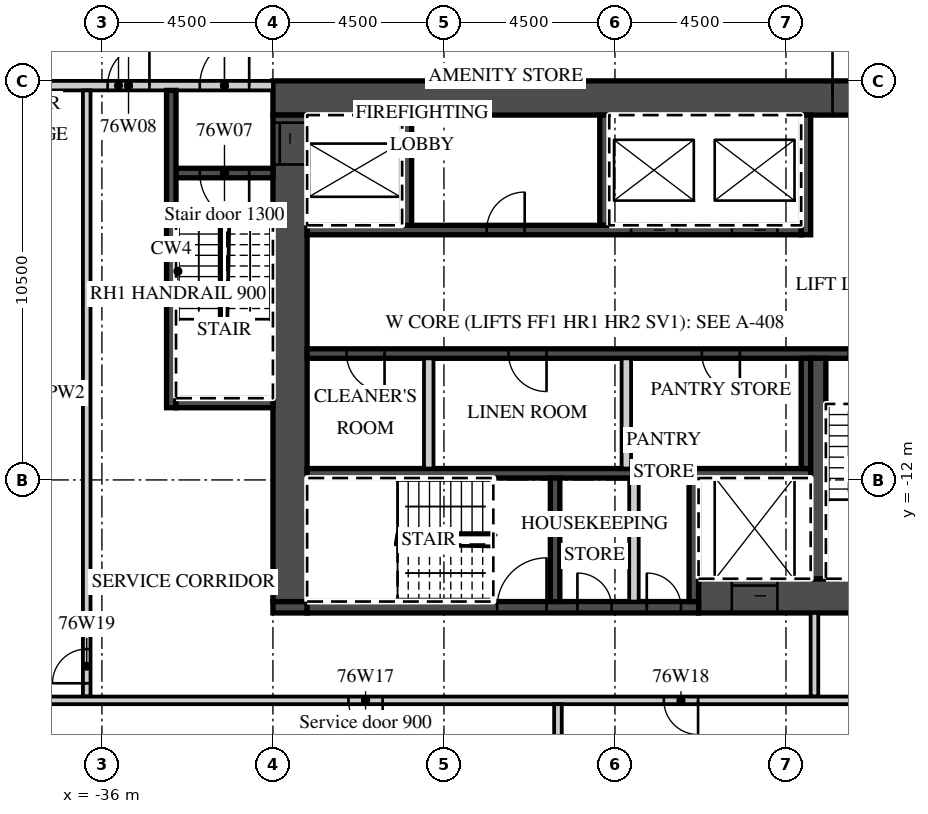
"""IFC4 building model, lengths in metres.
Left out: names, types, materials, properties, quantities, classifications, styles, units other than length and angle.
Written with IfcOpenShell. Run it as: python <this file> out.ifc"""

import sys

from ifc_helpers import new_model, si_unit, direction, frame, frame_2d, origin, place, context, subcontext, project, spatial, rectangle, extrude, element, fill, save


model = new_model("IFC4")
c1 = context("Model", 3, precision=1e-05, world=origin(), true_north=direction((0.0, 1.0)))
c2 = subcontext(c1, "Body", "Model", "MODEL_VIEW")
j1 = project(units=[si_unit("LENGTHUNIT", "METRE"), si_unit("PLANEANGLEUNIT", "RADIAN")], contexts=[c1])
p1 = place(None, origin())
s1 = spatial("IfcSite", under=j1, at=p1, CompositionType="ELEMENT")
p2 = place(p1, origin())
s2 = spatial("IfcBuilding", under=s1, at=p2, CompositionType="ELEMENT")
p3 = place(p2, frame((0.0, 0.0, 301.5)))
s3 = spatial("IfcBuildingStorey", under=s2, at=p3, CompositionType="ELEMENT", Elevation=301.5)
p4 = place(p3, frame((-31.5, -1.95, 0.0), z_axis=(0.0, 0.0, 1.0), x_axis=(1.0, 0.0, 0.0)))
e1 = element("IfcWall", 1, at=p4, inside=s3, PredefinedType="SHEAR", context=c2, shape_type="SweptSolid", body=[
    extrude(rectangle(XDim=18.0, YDim=0.9, at=frame_2d((9.0, 0.0))), origin(), (0.0, 0.0, 1.0), 3.02),
])
p5 = place(p4, frame((14.725, 0.0, 0.0)))
e2 = element("IfcOpeningElement", 2, at=p5, cuts=e1, PredefinedType="OPENING", context=c2, shape_type="SweptSolid", body=[
    extrude(rectangle(XDim=1.8, YDim=2.1, at=frame_2d((0.9, 1.05))), frame((0.0, 0.46, 0.0), z_axis=(0.0, -1.0, 0.0), x_axis=(1.0, 0.0, 0.0)), (0.0, 0.0, 1.0), 0.92),
])
p6 = place(p3, frame((-20.3, -15.05, 0.0), z_axis=(0.0, 0.0, 1.0), x_axis=(1.0, 0.0, 0.0)))
e3 = element("IfcWall", 3, at=p6, inside=s3, PredefinedType="SHEAR", context=c2, shape_type="SweptSolid", body=[
    extrude(rectangle(XDim=6.8, YDim=0.9, at=frame_2d((3.4, 0.0))), origin(), (0.0, 0.0, 1.0), 3.02),
])
p7 = place(p6, frame((0.875, 0.0, 0.0)))
e4 = element("IfcOpeningElement", 4, at=p7, cuts=e3, PredefinedType="OPENING", context=c2, shape_type="SweptSolid", body=[
    extrude(rectangle(XDim=1.2, YDim=2.1, at=frame_2d((0.6, 1.05))), frame((0.0, 0.46, 0.0), z_axis=(0.0, -1.0, 0.0), x_axis=(1.0, 0.0, 0.0)), (0.0, 0.0, 1.0), 0.92),
])
p8 = place(p3, frame((-31.5, -15.35, 0.0), z_axis=(0.0, 0.0, 1.0), x_axis=(1.0, 0.0, 0.0)))
e5 = element("IfcWall", 5, at=p8, inside=s3, PredefinedType="SHEAR", context=c2, shape_type="SweptSolid", body=[
    extrude(rectangle(XDim=0.9, YDim=0.3, at=frame_2d((0.45, 0.0))), origin(), (0.0, 0.0, 1.0), 3.02),
])
p9 = place(p3, frame((-30.6, -15.35, 0.0), z_axis=(0.0, 0.0, 1.0), x_axis=(1.0, 0.0, 0.0)))
e6 = element("IfcWall", 6, at=p9, inside=s3, PredefinedType="SHEAR", context=c2, shape_type="SweptSolid", body=[
    extrude(rectangle(XDim=10.3, YDim=0.3, at=frame_2d((5.15, 0.0))), origin(), (0.0, 0.0, 1.0), 3.02),
])
p10 = place(p9, frame((5.0, 0.0, 0.0)))
e7 = element("IfcOpeningElement", 7, at=p10, cuts=e6, PredefinedType="OPENING", context=c2, shape_type="SweptSolid", body=[
    extrude(rectangle(XDim=1.3, YDim=2.1, at=frame_2d((0.65, 1.05))), frame((0.0, 0.16, 0.0), z_axis=(0.0, -1.0, 0.0), x_axis=(1.0, 0.0, 0.0)), (0.0, 0.0, 1.0), 0.32),
])
p11 = place(p9, frame((7.113, 0.0, 0.0)))
e8 = element("IfcOpeningElement", 8, at=p11, cuts=e6, PredefinedType="OPENING", context=c2, shape_type="SweptSolid", body=[
    extrude(rectangle(XDim=0.9, YDim=2.1, at=frame_2d((0.45, 1.05))), frame((0.0, 0.16, 0.0), z_axis=(0.0, -1.0, 0.0), x_axis=(1.0, 0.0, 0.0)), (0.0, 0.0, 1.0), 0.32),
])
p12 = place(p9, frame((8.938, 0.0, 0.0)))
e9 = element("IfcOpeningElement", 9, at=p12, cuts=e6, PredefinedType="OPENING", context=c2, shape_type="SweptSolid", body=[
    extrude(rectangle(XDim=0.9, YDim=2.1, at=frame_2d((0.45, 1.05))), frame((0.0, 0.16, 0.0), z_axis=(0.0, -1.0, 0.0), x_axis=(1.0, 0.0, 0.0)), (0.0, 0.0, 1.0), 0.32),
])
p13 = place(p3, frame((-31.05, -15.2, 0.0), z_axis=(0.0, 0.0, 1.0), x_axis=(0.0, 1.0, 0.0)))
e10 = element("IfcWall", 10, at=p13, inside=s3, PredefinedType="SHEAR", context=c2, shape_type="SweptSolid", body=[
    extrude(rectangle(XDim=12.8, YDim=0.9, at=frame_2d((6.4, 0.0))), origin(), (0.0, 0.0, 1.0), 3.02),
])
p14 = place(p13, frame((11.5, 0.0, 0.0)))
e11 = element("IfcOpeningElement", 11, at=p14, cuts=e10, PredefinedType="OPENING", context=c2, shape_type="SweptSolid", body=[
    extrude(rectangle(XDim=1.1, YDim=2.1, at=frame_2d((0.55, 1.05))), frame((0.0, 0.46, 0.0), z_axis=(0.0, -1.0, 0.0), x_axis=(1.0, 0.0, 0.0)), (0.0, 0.0, 1.0), 0.92),
])
p15 = place(p3, frame((-30.6, -5.425, 0.0), z_axis=(0.0, 0.0, 1.0), x_axis=(1.0, 0.0, 0.0)))
e12 = element("IfcWall", 12, at=p15, inside=s3, PredefinedType="SHEAR", context=c2, shape_type="SweptSolid", body=[
    extrude(rectangle(XDim=13.0, YDim=0.25, at=frame_2d((6.5, 0.0))), origin(), (0.0, 0.0, 1.0), 3.02),
])
p16 = place(p15, frame((8.525, 0.0, 0.0)))
e13 = element("IfcOpeningElement", 13, at=p16, cuts=e12, PredefinedType="OPENING", context=c2, shape_type="SweptSolid", body=[
    extrude(rectangle(XDim=1.2, YDim=2.1, at=frame_2d((0.6, 1.05))), frame((0.0, 0.135, 0.0), z_axis=(0.0, -1.0, 0.0), x_axis=(1.0, 0.0, 0.0)), (0.0, 0.0, 1.0), 0.27),
])
p17 = place(p15, frame((11.175, 0.0, 0.0)))
e14 = element("IfcOpeningElement", 14, at=p17, cuts=e12, PredefinedType="OPENING", context=c2, shape_type="SweptSolid", body=[
    extrude(rectangle(XDim=1.2, YDim=2.1, at=frame_2d((0.6, 1.05))), frame((0.0, 0.135, 0.0), z_axis=(0.0, -1.0, 0.0), x_axis=(1.0, 0.0, 0.0)), (0.0, 0.0, 1.0), 0.27),
])
p18 = place(p15, frame((4.725, 0.0, 0.0)))
e15 = element("IfcOpeningElement", 15, at=p18, cuts=e12, PredefinedType="OPENING", context=c2, shape_type="SweptSolid", body=[
    extrude(rectangle(XDim=1.0, YDim=2.1, at=frame_2d((0.5, 1.05))), frame((0.0, 0.135, 0.0), z_axis=(0.0, -1.0, 0.0), x_axis=(1.0, 0.0, 0.0)), (0.0, 0.0, 1.0), 0.27),
])
p19 = place(p3, frame((-17.475, -5.55, 0.0), z_axis=(0.0, 0.0, 1.0), x_axis=(0.0, 1.0, 0.0)))
e16 = element("IfcWall", 16, at=p19, inside=s3, PredefinedType="SHEAR", context=c2, shape_type="SweptSolid", body=[
    extrude(rectangle(XDim=3.15, YDim=0.25, at=frame_2d((1.575, 0.0))), origin(), (0.0, 0.0, 1.0), 3.02),
])
for number, where, z_axis, x_axis in (
    (17, (-27.975, -5.3, 0.0), (0.0, 0.0, 1.0), (0.0, 1.0, 0.0)),
    (18, (-22.775, -5.3, 0.0), (0.0, 0.0, 1.0), (0.0, 1.0, 0.0)),
):
    element("IfcWall", number, at=place(p3, frame(where, z_axis=z_axis, x_axis=x_axis)), inside=s3, PredefinedType="SHEAR", context=c2, shape_type="SweptSolid", body=[
        extrude(rectangle(XDim=2.9, YDim=0.25, at=frame_2d((1.45, 0.0))), origin(), (0.0, 0.0, 1.0), 3.02),
    ])
p20 = place(p3, frame((-30.6, -8.675, 0.0), z_axis=(0.0, 0.0, 1.0), x_axis=(1.0, 0.0, 0.0)))
e19 = element("IfcWall", 19, at=p20, inside=s3, PredefinedType="SHEAR", context=c2, shape_type="SweptSolid", body=[
    extrude(rectangle(XDim=16.2, YDim=0.25, at=frame_2d((8.1, 0.0))), origin(), (0.0, 0.0, 1.0), 3.02),
])
p21 = place(p20, frame((14.25, 0.0, 0.0)))
e20 = element("IfcOpeningElement", 20, at=p21, cuts=e19, PredefinedType="OPENING", context=c2, shape_type="SweptSolid", body=[
    extrude(rectangle(XDim=1.3, YDim=2.1, at=frame_2d((0.65, 1.05))), frame((0.0, 0.135, 0.0), z_axis=(0.0, -1.0, 0.0), x_axis=(1.0, 0.0, 0.0)), (0.0, 0.0, 1.0), 0.27),
])
p22 = place(p20, frame((1.038, 0.0, 0.0)))
e21 = element("IfcOpeningElement", 21, at=p22, cuts=e19, PredefinedType="OPENING", context=c2, shape_type="SweptSolid", body=[
    extrude(rectangle(XDim=1.0, YDim=2.1, at=frame_2d((0.5, 1.05))), frame((0.0, 0.135, 0.0), z_axis=(0.0, -1.0, 0.0), x_axis=(1.0, 0.0, 0.0)), (0.0, 0.0, 1.0), 0.27),
])
p23 = place(p20, frame((5.3, 0.0, 0.0)))
e22 = element("IfcOpeningElement", 22, at=p23, cuts=e19, PredefinedType="OPENING", context=c2, shape_type="SweptSolid", body=[
    extrude(rectangle(XDim=1.0, YDim=2.1, at=frame_2d((0.5, 1.05))), frame((0.0, 0.135, 0.0), z_axis=(0.0, -1.0, 0.0), x_axis=(1.0, 0.0, 0.0)), (0.0, 0.0, 1.0), 0.27),
])
p24 = place(p20, frame((10.387, 0.0, 0.0)))
e23 = element("IfcOpeningElement", 23, at=p24, cuts=e19, PredefinedType="OPENING", context=c2, shape_type="SweptSolid", body=[
    extrude(rectangle(XDim=1.0, YDim=2.1, at=frame_2d((0.5, 1.05))), frame((0.0, 0.135, 0.0), z_axis=(0.0, -1.0, 0.0), x_axis=(1.0, 0.0, 0.0)), (0.0, 0.0, 1.0), 0.27),
])
p25 = place(p3, frame((-30.6, -11.825, 0.0), z_axis=(0.0, 0.0, 1.0), x_axis=(1.0, 0.0, 0.0)))
e24 = element("IfcWall", 24, at=p25, inside=s3, PredefinedType="SHEAR", context=c2, shape_type="SweptSolid", body=[
    extrude(rectangle(XDim=13.25, YDim=0.25, at=frame_2d((6.625, 0.0))), origin(), (0.0, 0.0, 1.0), 3.02),
])
p26 = place(p3, frame((-17.475, -11.7, 0.0), z_axis=(0.0, 0.0, 1.0), x_axis=(0.0, 1.0, 0.0)))
e25 = element("IfcWall", 25, at=p26, inside=s3, PredefinedType="SHEAR", context=c2, shape_type="SweptSolid", body=[
    extrude(rectangle(XDim=2.9, YDim=0.25, at=frame_2d((1.45, 0.0))), origin(), (0.0, 0.0, 1.0), 3.02),
])
for number, where, z_axis, x_axis in (
    (26, (-27.4, -11.7, 0.0), (0.0, 0.0, 1.0), (0.0, 1.0, 0.0)),
    (27, (-22.2, -11.7, 0.0), (0.0, 0.0, 1.0), (0.0, 1.0, 0.0)),
):
    element("IfcWall", number, at=place(p3, frame(where, z_axis=z_axis, x_axis=x_axis)), inside=s3, PredefinedType="PARTITIONING", context=c2, shape_type="SweptSolid", body=[
        extrude(rectangle(XDim=2.9, YDim=0.25, at=frame_2d((1.45, 0.0))), origin(), (0.0, 0.0, 1.0), 3.02),
    ])
p27 = place(p3, frame((-17.15, -14.6, 0.0), z_axis=(0.0, 0.0, 1.0), x_axis=(0.0, 1.0, 0.0)))
e28 = element("IfcWall", 28, at=p27, inside=s3, PredefinedType="SHEAR", context=c2, shape_type="SweptSolid", body=[
    extrude(rectangle(XDim=5.8, YDim=0.4, at=frame_2d((2.9, 0.0))), origin(), (0.0, 0.0, 1.0), 3.02),
])
for number, where, z_axis, x_axis in (
    (29, (-20.425, -15.2, 0.0), (0.0, 0.0, 1.0), (0.0, 1.0, 0.0)),
    (30, (-24.075, -15.2, 0.0), (0.0, 0.0, 1.0), (0.0, 1.0, 0.0)),
):
    element("IfcWall", number, at=place(p3, frame(where, z_axis=z_axis, x_axis=x_axis)), inside=s3, PredefinedType="SHEAR", context=c2, shape_type="SweptSolid", body=[
        extrude(rectangle(XDim=3.25, YDim=0.25, at=frame_2d((1.625, 0.0))), origin(), (0.0, 0.0, 1.0), 3.02),
    ])
p28 = place(p3, frame((-22.0, -15.2, 0.0), z_axis=(0.0, 0.0, 1.0), x_axis=(0.0, 1.0, 0.0)))
e31 = element("IfcWall", 31, at=p28, inside=s3, PredefinedType="PARTITIONING", context=c2, shape_type="SweptSolid", body=[
    extrude(rectangle(XDim=3.25, YDim=0.25, at=frame_2d((1.625, 0.0))), origin(), (0.0, 0.0, 1.0), 3.02),
])
p29 = place(p3, frame((-39.627, -1.625, 0.0), z_axis=(0.0, 0.0, 1.0), x_axis=(1.0, 0.0, 0.0)))
e32 = element("IfcWall", 32, at=p29, inside=s3, PredefinedType="PARTITIONING", context=c2, shape_type="SweptSolid", body=[
    extrude(rectangle(XDim=8.127, YDim=0.25, at=frame_2d((4.063, 0.0))), origin(), (0.0, 0.0, 1.0), 3.02),
])
p30 = place(p29, frame((6.202, 0.0, 0.0)))
e33 = element("IfcOpeningElement", 33, at=p30, cuts=e32, PredefinedType="OPENING", context=c2, shape_type="SweptSolid", body=[
    extrude(rectangle(XDim=1.3, YDim=2.1, at=frame_2d((0.65, 1.05))), frame((0.0, 0.135, 0.0), z_axis=(0.0, -1.0, 0.0), x_axis=(1.0, 0.0, 0.0)), (0.0, 0.0, 1.0), 0.27),
])
p31 = place(p29, frame((3.777, 0.0, 0.0)))
e34 = element("IfcOpeningElement", 34, at=p31, cuts=e32, PredefinedType="OPENING", context=c2, shape_type="SweptSolid", body=[
    extrude(rectangle(XDim=1.1, YDim=2.1, at=frame_2d((0.55, 1.05))), frame((0.0, 0.135, 0.0), z_axis=(0.0, -1.0, 0.0), x_axis=(1.0, 0.0, 0.0)), (0.0, 0.0, 1.0), 0.27),
])
p32 = place(p3, frame((-34.05, -3.925, 0.0), z_axis=(0.0, 0.0, 1.0), x_axis=(1.0, 0.0, 0.0)))
e35 = element("IfcWall", 35, at=p32, inside=s3, PredefinedType="SHEAR", context=c2, shape_type="SweptSolid", body=[
    extrude(rectangle(XDim=2.55, YDim=0.25, at=frame_2d((1.275, 0.0))), origin(), (0.0, 0.0, 1.0), 3.02),
])
p33 = place(p32, frame((0.625, 0.0, 0.0)))
e36 = element("IfcOpeningElement", 36, at=p33, cuts=e35, PredefinedType="OPENING", context=c2, shape_type="SweptSolid", body=[
    extrude(rectangle(XDim=1.3, YDim=2.1, at=frame_2d((0.65, 1.05))), frame((0.0, 0.135, 0.0), z_axis=(0.0, -1.0, 0.0), x_axis=(1.0, 0.0, 0.0)), (0.0, 0.0, 1.0), 0.27),
])
p34 = place(p3, frame((-34.175, -10.1, 0.0), z_axis=(0.0, 0.0, 1.0), x_axis=(0.0, 1.0, 0.0)))
e37 = element("IfcWall", 37, at=p34, inside=s3, PredefinedType="SHEAR", context=c2, shape_type="SweptSolid", body=[
    extrude(rectangle(XDim=8.35, YDim=0.25, at=frame_2d((4.175, 0.0))), origin(), (0.0, 0.0, 1.0), 3.02),
])
p35 = place(p3, frame((-34.05, -9.975, 0.0), z_axis=(0.0, 0.0, 1.0), x_axis=(1.0, 0.0, 0.0)))
e38 = element("IfcWall", 38, at=p35, inside=s3, PredefinedType="SHEAR", context=c2, shape_type="SweptSolid", body=[
    extrude(rectangle(XDim=2.55, YDim=0.25, at=frame_2d((1.275, 0.0))), origin(), (0.0, 0.0, 1.0), 3.02),
])
p36 = place(p3, frame((-17.25, -17.7, 0.0), z_axis=(0.0, 0.0, 1.0), x_axis=(0.0, 1.0, 0.0)))
e39 = element("IfcWall", 39, at=p36, inside=s3, PredefinedType="PARTITIONING", context=c2, shape_type="SweptSolid", body=[
    extrude(rectangle(XDim=2.2, YDim=0.2, at=frame_2d((1.1, 0.0))), origin(), (0.0, 0.0, 1.0), 3.02),
])
p37 = place(p3, frame((-36.4, -17.7, 0.0), z_axis=(0.0, 0.0, 1.0), x_axis=(0.0, 1.0, 0.0)))
e40 = element("IfcWall", 40, at=p37, inside=s3, PredefinedType="PARTITIONING", context=c2, shape_type="SweptSolid", body=[
    extrude(rectangle(XDim=15.95, YDim=0.2, at=frame_2d((7.975, 0.0))), origin(), (0.0, 0.0, 1.0), 3.02),
])
p38 = place(p37, frame((0.35, 0.0, 0.0)))
e41 = element("IfcOpeningElement", 41, at=p38, cuts=e40, PredefinedType="OPENING", context=c2, shape_type="SweptSolid", body=[
    extrude(rectangle(XDim=0.9, YDim=2.1, at=frame_2d((0.45, 1.05))), frame((0.0, 0.11, 0.0), z_axis=(0.0, -1.0, 0.0), x_axis=(1.0, 0.0, 0.0)), (0.0, 0.0, 1.0), 0.22),
])
p39 = place(p3, frame((-38.07, -17.8, 0.0), z_axis=(0.0, 0.0, 1.0), x_axis=(1.0, 0.0, 0.0)))
e42 = element("IfcWall", 42, at=p39, inside=s3, PredefinedType="PARTITIONING", context=c2, shape_type="SweptSolid", body=[
    extrude(rectangle(XDim=24.47, YDim=0.2, at=frame_2d((12.235, 0.0))), origin(), (0.0, 0.0, 1.0), 3.02),
])
p40 = place(p39, frame((8.557, 0.0, 0.0)))
e43 = element("IfcOpeningElement", 43, at=p40, cuts=e42, PredefinedType="OPENING", context=c2, shape_type="SweptSolid", body=[
    extrude(rectangle(XDim=0.9, YDim=2.1, at=frame_2d((0.45, 1.05))), frame((0.0, 0.11, 0.0), z_axis=(0.0, -1.0, 0.0), x_axis=(1.0, 0.0, 0.0)), (0.0, 0.0, 1.0), 0.22),
])
p41 = place(p39, frame((16.857, 0.0, 0.0)))
e44 = element("IfcOpeningElement", 44, at=p41, cuts=e42, PredefinedType="OPENING", context=c2, shape_type="SweptSolid", body=[
    extrude(rectangle(XDim=0.9, YDim=2.1, at=frame_2d((0.45, 1.05))), frame((0.0, 0.11, 0.0), z_axis=(0.0, -1.0, 0.0), x_axis=(1.0, 0.0, 0.0)), (0.0, 0.0, 1.0), 0.22),
])
p42 = place(p3, frame((-24.0, -22.408, 0.0), z_axis=(0.0, 0.0, 1.0), x_axis=(0.0, 1.0, 0.0)))
e45 = element("IfcWall", 45, at=p42, inside=s3, PredefinedType="PARTITIONING", context=c2, shape_type="SweptSolid", body=[
    extrude(rectangle(XDim=4.508, YDim=0.2, at=frame_2d((2.254, 0.0))), origin(), (0.0, 0.0, 1.0), 3.02),
])
p43 = place(p16, origin())
e46 = element("IfcDoor", 46, at=p43, inside=s3, OperationType="SLIDING_TO_LEFT", PredefinedType="DOOR", context=c2, shape_type="SweptSolid", body=[
    extrude(rectangle(XDim=1.2, YDim=2.1, at=frame_2d((0.6, 1.05))), frame((0.0, 0.025, 0.0), z_axis=(0.0, -1.0, 0.0), x_axis=(1.0, 0.0, 0.0)), (0.0, 0.0, 1.0), 0.05),
])
fill(e13, e46)
p44 = place(p17, origin())
e47 = element("IfcDoor", 47, at=p44, inside=s3, OperationType="SLIDING_TO_RIGHT", PredefinedType="DOOR", context=c2, shape_type="SweptSolid", body=[
    extrude(rectangle(XDim=1.2, YDim=2.1, at=frame_2d((0.6, 1.05))), frame((0.0, 0.025, 0.0), z_axis=(0.0, -1.0, 0.0), x_axis=(1.0, 0.0, 0.0)), (0.0, 0.0, 1.0), 0.05),
])
fill(e14, e47)
p45 = place(p7, origin())
e48 = element("IfcDoor", 48, at=p45, inside=s3, OperationType="SLIDING_TO_LEFT", PredefinedType="DOOR", context=c2, shape_type="SweptSolid", body=[
    extrude(rectangle(XDim=1.2, YDim=2.1, at=frame_2d((0.6, 1.05))), frame((0.0, 0.025, 0.0), z_axis=(0.0, -1.0, 0.0), x_axis=(1.0, 0.0, 0.0)), (0.0, 0.0, 1.0), 0.05),
])
fill(e4, e48)
p46 = place(p14, origin())
e49 = element("IfcDoor", 49, at=p46, inside=s3, OperationType="SLIDING_TO_RIGHT", PredefinedType="DOOR", context=c2, shape_type="SweptSolid", body=[
    extrude(rectangle(XDim=1.1, YDim=2.1, at=frame_2d((0.55, 1.05))), frame((0.0, 0.025, 0.0), z_axis=(0.0, -1.0, 0.0), x_axis=(1.0, 0.0, 0.0)), (0.0, 0.0, 1.0), 0.05),
])
fill(e11, e49)
p47 = place(p5, origin())
e50 = element("IfcDoor", 50, at=p47, inside=s3, OperationType="DOUBLE_DOOR_DOUBLE_SWING", PredefinedType="DOOR", context=c2, shape_type="SweptSolid", body=[
    extrude(rectangle(XDim=1.8, YDim=2.1, at=frame_2d((0.9, 1.05))), frame((0.0, 0.025, 0.0), z_axis=(0.0, -1.0, 0.0), x_axis=(1.0, 0.0, 0.0)), (0.0, 0.0, 1.0), 0.05),
])
fill(e2, e50)
p48 = place(p30, origin())
e51 = element("IfcDoor", 51, at=p48, inside=s3, OperationType="SINGLE_SWING_RIGHT", PredefinedType="DOOR", context=c2, shape_type="SweptSolid", body=[
    extrude(rectangle(XDim=1.3, YDim=2.1, at=frame_2d((0.65, 1.05))), frame((0.0, 0.025, 0.0), z_axis=(0.0, -1.0, 0.0), x_axis=(1.0, 0.0, 0.0)), (0.0, 0.0, 1.0), 0.05),
])
fill(e33, e51)
p49 = place(p33, origin())
e52 = element("IfcDoor", 52, at=p49, inside=s3, OperationType="SINGLE_SWING_RIGHT", PredefinedType="DOOR", context=c2, shape_type="SweptSolid", body=[
    extrude(rectangle(XDim=1.3, YDim=2.1, at=frame_2d((0.65, 1.05))), frame((0.0, 0.025, 0.0), z_axis=(0.0, -1.0, 0.0), x_axis=(1.0, 0.0, 0.0)), (0.0, 0.0, 1.0), 0.05),
])
fill(e36, e52)
p50 = place(p31, origin())
e53 = element("IfcDoor", 53, at=p50, inside=s3, OperationType="SINGLE_SWING_RIGHT", PredefinedType="DOOR", context=c2, shape_type="SweptSolid", body=[
    extrude(rectangle(XDim=1.1, YDim=2.1, at=frame_2d((0.55, 1.05))), frame((0.0, 0.025, 0.0), z_axis=(0.0, -1.0, 0.0), x_axis=(1.0, 0.0, 0.0)), (0.0, 0.0, 1.0), 0.05),
])
fill(e34, e53)
p51 = place(p21, origin())
e54 = element("IfcDoor", 54, at=p51, inside=s3, OperationType="SINGLE_SWING_RIGHT", PredefinedType="DOOR", context=c2, shape_type="SweptSolid", body=[
    extrude(rectangle(XDim=1.3, YDim=2.1, at=frame_2d((0.65, 1.05))), frame((0.0, 0.025, 0.0), z_axis=(0.0, -1.0, 0.0), x_axis=(1.0, 0.0, 0.0)), (0.0, 0.0, 1.0), 0.05),
])
fill(e20, e54)
p52 = place(p10, origin())
e55 = element("IfcDoor", 55, at=p52, inside=s3, OperationType="SINGLE_SWING_RIGHT", PredefinedType="DOOR", context=c2, shape_type="SweptSolid", body=[
    extrude(rectangle(XDim=1.3, YDim=2.1, at=frame_2d((0.65, 1.05))), frame((0.0, 0.025, 0.0), z_axis=(0.0, -1.0, 0.0), x_axis=(1.0, 0.0, 0.0)), (0.0, 0.0, 1.0), 0.05),
])
fill(e7, e55)
p53 = place(p11, origin())
e56 = element("IfcDoor", 56, at=p53, inside=s3, OperationType="SINGLE_SWING_LEFT", PredefinedType="DOOR", context=c2, shape_type="SweptSolid", body=[
    extrude(rectangle(XDim=0.9, YDim=2.1, at=frame_2d((0.45, 1.05))), frame((0.0, 0.025, 0.0), z_axis=(0.0, -1.0, 0.0), x_axis=(1.0, 0.0, 0.0)), (0.0, 0.0, 1.0), 0.05),
])
fill(e8, e56)
p54 = place(p12, origin())
e57 = element("IfcDoor", 57, at=p54, inside=s3, OperationType="SINGLE_SWING_LEFT", PredefinedType="DOOR", context=c2, shape_type="SweptSolid", body=[
    extrude(rectangle(XDim=0.9, YDim=2.1, at=frame_2d((0.45, 1.05))), frame((0.0, 0.025, 0.0), z_axis=(0.0, -1.0, 0.0), x_axis=(1.0, 0.0, 0.0)), (0.0, 0.0, 1.0), 0.05),
])
fill(e9, e57)
p55 = place(p22, origin())
e58 = element("IfcDoor", 58, at=p55, inside=s3, OperationType="SINGLE_SWING_RIGHT", PredefinedType="DOOR", context=c2, shape_type="SweptSolid", body=[
    extrude(rectangle(XDim=1.0, YDim=2.1, at=frame_2d((0.5, 1.05))), frame((0.0, 0.025, 0.0), z_axis=(0.0, -1.0, 0.0), x_axis=(1.0, 0.0, 0.0)), (0.0, 0.0, 1.0), 0.05),
])
fill(e21, e58)
p56 = place(p23, origin())
e59 = element("IfcDoor", 59, at=p56, inside=s3, OperationType="SINGLE_SWING_RIGHT", PredefinedType="DOOR", context=c2, shape_type="SweptSolid", body=[
    extrude(rectangle(XDim=1.0, YDim=2.1, at=frame_2d((0.5, 1.05))), frame((0.0, 0.025, 0.0), z_axis=(0.0, -1.0, 0.0), x_axis=(1.0, 0.0, 0.0)), (0.0, 0.0, 1.0), 0.05),
])
fill(e22, e59)
p57 = place(p24, origin())
e60 = element("IfcDoor", 60, at=p57, inside=s3, OperationType="SINGLE_SWING_RIGHT", PredefinedType="DOOR", context=c2, shape_type="SweptSolid", body=[
    extrude(rectangle(XDim=1.0, YDim=2.1, at=frame_2d((0.5, 1.05))), frame((0.0, 0.025, 0.0), z_axis=(0.0, -1.0, 0.0), x_axis=(1.0, 0.0, 0.0)), (0.0, 0.0, 1.0), 0.05),
])
fill(e23, e60)
p58 = place(p18, origin())
e61 = element("IfcDoor", 61, at=p58, inside=s3, OperationType="SINGLE_SWING_RIGHT", PredefinedType="DOOR", context=c2, shape_type="SweptSolid", body=[
    extrude(rectangle(XDim=1.0, YDim=2.1, at=frame_2d((0.5, 1.05))), frame((0.0, 0.025, 0.0), z_axis=(0.0, -1.0, 0.0), x_axis=(1.0, 0.0, 0.0)), (0.0, 0.0, 1.0), 0.05),
])
fill(e15, e61)
p59 = place(p40, origin())
e62 = element("IfcDoor", 62, at=p59, inside=s3, OperationType="SINGLE_SWING_RIGHT", PredefinedType="DOOR", context=c2, shape_type="SweptSolid", body=[
    extrude(rectangle(XDim=0.9, YDim=2.1, at=frame_2d((0.45, 1.05))), frame((0.0, 0.025, 0.0), z_axis=(0.0, -1.0, 0.0), x_axis=(1.0, 0.0, 0.0)), (0.0, 0.0, 1.0), 0.05),
])
fill(e43, e62)
p60 = place(p41, origin())
e63 = element("IfcDoor", 63, at=p60, inside=s3, OperationType="SINGLE_SWING_RIGHT", PredefinedType="DOOR", context=c2, shape_type="SweptSolid", body=[
    extrude(rectangle(XDim=0.9, YDim=2.1, at=frame_2d((0.45, 1.05))), frame((0.0, 0.025, 0.0), z_axis=(0.0, -1.0, 0.0), x_axis=(1.0, 0.0, 0.0)), (0.0, 0.0, 1.0), 0.05),
])
fill(e44, e63)
p61 = place(p38, origin())
e64 = element("IfcDoor", 64, at=p61, inside=s3, OperationType="SINGLE_SWING_LEFT", PredefinedType="DOOR", context=c2, shape_type="SweptSolid", body=[
    extrude(rectangle(XDim=0.9, YDim=2.1, at=frame_2d((0.45, 1.05))), frame((0.0, 0.025, 0.0), z_axis=(0.0, -1.0, 0.0), x_axis=(1.0, 0.0, 0.0)), (0.0, 0.0, 1.0), 0.05),
])
fill(e41, e64)
save(model, sys.argv[1])
